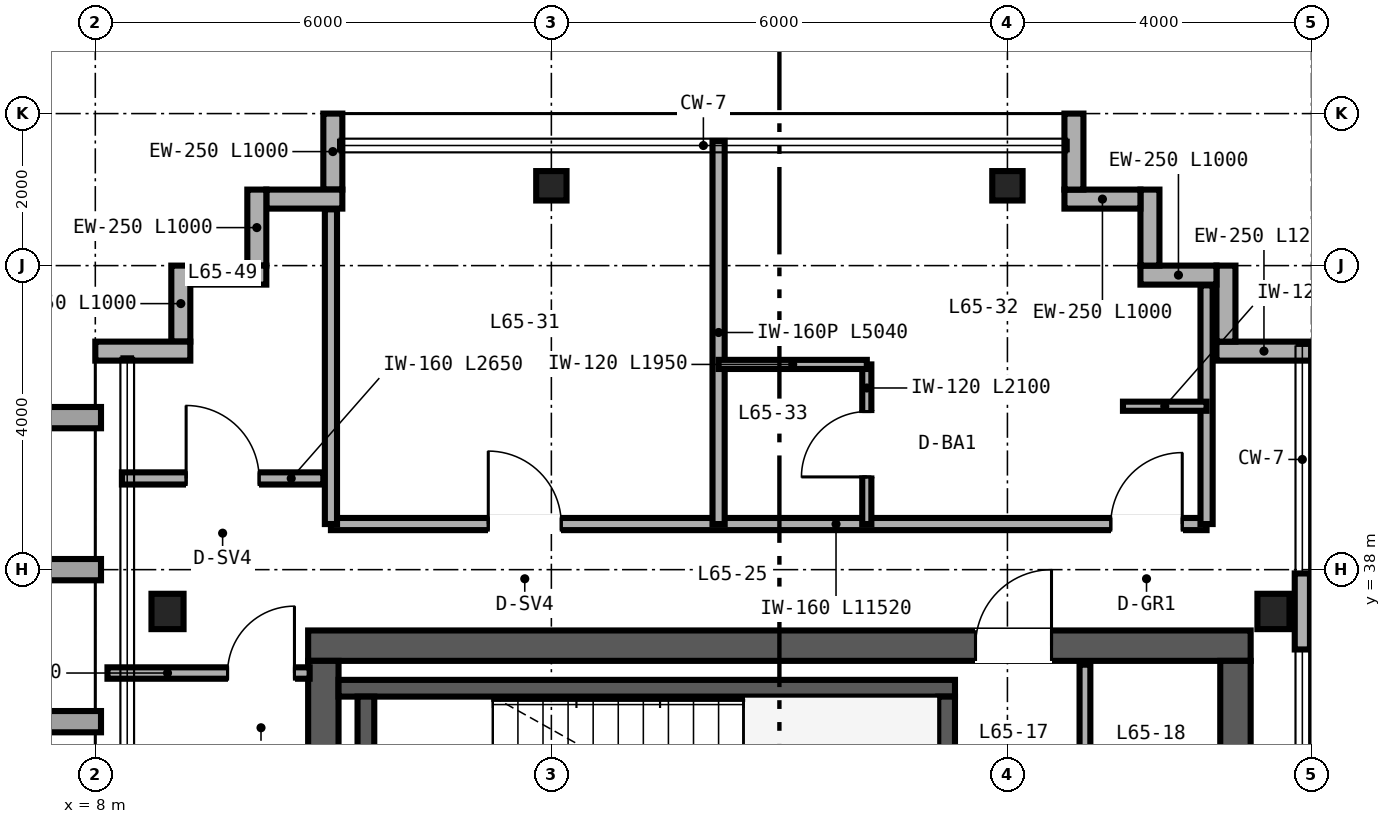
"""IFC4 building model, lengths in metres.
Left out: names, types, materials, properties, quantities, classifications, styles, units other than length and angle.
Written with IfcOpenShell. Run it as: python <this file> out.ifc"""

import sys

from ifc_helpers import new_model, si_unit, direction, frame, frame_2d, origin, origin_2d, place, context, subcontext, project, spatial, rectangle, i_section, extrude, source, transform, mapped, element, fill, save


model = new_model("IFC4")
c1 = context("Model", 3, precision=1e-05, world=origin(), true_north=direction((0.0, 1.0)))
c2 = subcontext(c1, "Body", "Model", "MODEL_VIEW")
j1 = project(units=[si_unit("LENGTHUNIT", "METRE"), si_unit("PLANEANGLEUNIT", "RADIAN")], contexts=[c1])
p1 = place(None, origin())
s1 = spatial("IfcSite", under=j1, at=p1, CompositionType="ELEMENT")
p2 = place(p1, origin())
s2 = spatial("IfcBuilding", under=s1, at=p2, CompositionType="ELEMENT")
p3 = place(p2, frame((0.0, 0.0, 258.0)))
s3 = spatial("IfcBuildingStorey", under=s2, at=p3, CompositionType="ELEMENT", Elevation=258.0)
p4 = place(p3, frame((10.8, 37.0, 0.0), z_axis=(0.0, 0.0, 1.0), x_axis=(1.0, 0.0, 0.0)))
e1 = element("IfcWall", 1, at=p4, inside=s3, PredefinedType="SHEAR", context=c2, shape_type="SweptSolid", body=[
    extrude(rectangle(XDim=12.4, YDim=0.4, at=frame_2d((6.2, 0.0))), origin(), (0.0, 0.0, 1.0), 3.38),
])
p5 = place(p4, frame((8.78, 0.0, 0.0)))
e2 = element("IfcOpeningElement", 2, at=p5, cuts=e1, PredefinedType="OPENING", context=c2, shape_type="SweptSolid", body=[
    extrude(rectangle(XDim=1.0, YDim=2.15, at=frame_2d((0.5, 1.075))), frame((0.0, 0.21, 0.0), z_axis=(0.0, -1.0, 0.0), x_axis=(1.0, 0.0, 0.0)), (0.0, 0.0, 1.0), 0.42),
])
for number, where, z_axis, x_axis in (
    (3, (11.0, 15.2, 0.0), (0.0, 0.0, 1.0), (0.0, 1.0, 0.0)),
    (4, (23.0, 15.2, 0.0), (0.0, 0.0, 1.0), (0.0, 1.0, 0.0)),
):
    element("IfcWall", number, at=place(p3, frame(where, z_axis=z_axis, x_axis=x_axis)), inside=s3, PredefinedType="SHEAR", context=c2, shape_type="SweptSolid", body=[
        extrude(rectangle(XDim=21.6, YDim=0.4, at=frame_2d((10.8, 0.0))), origin(), (0.0, 0.0, 1.0), 3.38),
    ])
p6 = place(p3, frame((11.2, 36.44, 0.0), z_axis=(0.0, 0.0, 1.0), x_axis=(1.0, 0.0, 0.0)))
e5 = element("IfcWall", 5, at=p6, inside=s3, PredefinedType="SHEAR", context=c2, shape_type="SweptSolid", body=[
    extrude(rectangle(XDim=8.11, YDim=0.22, at=frame_2d((4.055, 0.0))), origin(), (0.0, 0.0, 1.0), 3.4),
])
for number, where, z_axis, x_axis in (
    (6, (11.56, 33.05, 0.0), (0.0, 0.0, 1.0), (0.0, 1.0, 0.0)),
    (7, (19.2, 33.05, 0.0), (0.0, 0.0, 1.0), (0.0, 1.0, 0.0)),
):
    element("IfcWall", number, at=place(p3, frame(where, z_axis=z_axis, x_axis=x_axis)), inside=s3, PredefinedType="SHEAR", context=c2, shape_type="SweptSolid", body=[
        extrude(rectangle(XDim=3.28, YDim=0.22, at=frame_2d((1.64, 0.0))), origin(), (0.0, 0.0, 1.0), 3.4),
    ])
m1 = source(origin(), c2, "Body", "SweptSolid", [
    extrude(i_section(OverallWidth=0.422, OverallDepth=0.465, WebThickness=0.045, FlangeThickness=0.073, FilletRadius=0.025, at=origin_2d()), origin(), (0.0, 0.0, 1.0), 3.38),
])
for number, where, z_axis, x_axis in (
    (8, (8.95, 37.45, 0.0), (0.0, 0.0, 1.0), (1.0, 0.0, 0.0)),
    (9, (23.5, 37.45, 0.0), (0.0, 0.0, 1.0), (1.0, 0.0, 0.0)),
):
    element("IfcColumn", number, at=place(p3, frame(where, z_axis=z_axis, x_axis=x_axis)), inside=s3, PredefinedType="COLUMN", context=c2, shape_type="MappedRepresentation", body=[
        mapped(m1, transform((0.0, 0.0, 0.0), scale=1.0)),
    ])
m2 = source(origin(), c2, "Body", "SweptSolid", [
    extrude(i_section(OverallWidth=0.399, OverallDepth=0.387, WebThickness=0.021, FlangeThickness=0.033, FilletRadius=0.025, at=origin_2d()), origin(), (0.0, 0.0, 1.0), 3.38),
])
for number, where, z_axis, x_axis in (
    (10, (14.0, 43.05, 0.0), (0.0, 0.0, 1.0), (1.0, 0.0, 0.0)),
    (11, (20.0, 43.05, 0.0), (0.0, 0.0, 1.0), (1.0, 0.0, 0.0)),
):
    element("IfcColumn", number, at=place(p3, frame(where, z_axis=z_axis, x_axis=x_axis)), inside=s3, PredefinedType="COLUMN", context=c2, shape_type="MappedRepresentation", body=[
        mapped(m2, transform((0.0, 0.0, 0.0), scale=1.0)),
    ])
p7 = place(p3, frame((24.0, 40.875, 0.0), z_axis=(0.0, 0.0, 1.0), x_axis=(-1.0, 0.0, 0.0)))
e12 = element("IfcWall", 12, at=p7, inside=s3, PredefinedType="SOLIDWALL", context=c2, shape_type="SweptSolid", body=[
    extrude(rectangle(XDim=1.25, YDim=0.25, at=frame_2d((0.625, 0.0))), origin(), (0.0, 0.0, 1.0), 3.38),
])
for number, where, z_axis, x_axis in (
    (13, (22.875, 41.0, 0.0), (0.0, 0.0, 1.0), (0.0, 1.0, 0.0)),
    (14, (22.75, 41.875, 0.0), (0.0, 0.0, 1.0), (-1.0, 0.0, 0.0)),
    (15, (21.875, 42.0, 0.0), (0.0, 0.0, 1.0), (0.0, 1.0, 0.0)),
    (16, (21.75, 42.875, 0.0), (0.0, 0.0, 1.0), (-1.0, 0.0, 0.0)),
    (17, (20.875, 43.0, 0.0), (0.0, 0.0, 1.0), (0.0, 1.0, 0.0)),
    (18, (11.125, 44.0, 0.0), (0.0, 0.0, 1.0), (0.0, -1.0, 0.0)),
    (19, (11.25, 42.875, 0.0), (0.0, 0.0, 1.0), (-1.0, 0.0, 0.0)),
    (20, (10.125, 43.0, 0.0), (0.0, 0.0, 1.0), (0.0, -1.0, 0.0)),
    (21, (10.25, 41.875, 0.0), (0.0, 0.0, 1.0), (-1.0, 0.0, 0.0)),
    (22, (9.125, 42.0, 0.0), (0.0, 0.0, 1.0), (0.0, -1.0, 0.0)),
):
    element("IfcWall", number, at=place(p3, frame(where, z_axis=z_axis, x_axis=x_axis)), inside=s3, PredefinedType="SOLIDWALL", context=c2, shape_type="SweptSolid", body=[
        extrude(rectangle(XDim=1.0, YDim=0.25, at=frame_2d((0.5, 0.0))), origin(), (0.0, 0.0, 1.0), 3.38),
    ])
p8 = place(p3, frame((9.25, 40.875, 0.0), z_axis=(0.0, 0.0, 1.0), x_axis=(-1.0, 0.0, 0.0)))
e23 = element("IfcWall", 23, at=p8, inside=s3, PredefinedType="SOLIDWALL", context=c2, shape_type="SweptSolid", body=[
    extrude(rectangle(XDim=1.25, YDim=0.25, at=frame_2d((0.625, 0.0))), origin(), (0.0, 0.0, 1.0), 3.38),
])
p9 = place(p3, frame((23.88, 36.95, 0.0), z_axis=(0.0, 0.0, 1.0), x_axis=(0.0, 1.0, 0.0)))
e24 = element("IfcWall", 24, at=p9, inside=s3, PredefinedType="PARAPET", context=c2, shape_type="SweptSolid", body=[
    extrude(rectangle(XDim=1.0, YDim=0.2, at=frame_2d((0.5, 0.0))), origin(), (0.0, 0.0, 1.0), 3.38),
])
p10 = place(p3, frame((21.02, 33.28, 0.0), z_axis=(0.0, 0.0, 1.0), x_axis=(0.0, 1.0, 0.0)))
e25 = element("IfcWall", 25, at=p10, inside=s3, PredefinedType="PARTITIONING", context=c2, shape_type="SweptSolid", body=[
    extrude(rectangle(XDim=3.47, YDim=0.142, at=frame_2d((1.735, 0.0))), origin(), (0.0, 0.0, 1.0), 3.38),
])
p11 = place(p10, frame((1.15, 0.0, 0.0)))
e26 = element("IfcOpeningElement", 26, at=p11, cuts=e25, PredefinedType="OPENING", context=c2, shape_type="SweptSolid", body=[
    extrude(rectangle(XDim=0.84, YDim=2.1, at=frame_2d((0.42, 1.05))), frame((0.0, 0.081, 0.0), z_axis=(0.0, -1.0, 0.0), x_axis=(1.0, 0.0, 0.0)), (0.0, 0.0, 1.0), 0.162),
])
p12 = place(p3, frame((11.1, 38.6, 0.0), z_axis=(0.0, 0.0, 1.0), x_axis=(1.0, 0.0, 0.0)))
e27 = element("IfcWall", 27, at=p12, inside=s3, PredefinedType="PARTITIONING", context=c2, shape_type="SweptSolid", body=[
    extrude(rectangle(XDim=11.52, YDim=0.16, at=frame_2d((5.76, 0.0))), origin(), (0.0, 0.0, 1.0), 3.38),
])
p13 = place(p12, frame((2.07, 0.0, 0.0)))
e28 = element("IfcOpeningElement", 28, at=p13, cuts=e27, PredefinedType="OPENING", context=c2, shape_type="SweptSolid", body=[
    extrude(rectangle(XDim=0.96, YDim=2.15, at=frame_2d((0.48, 1.075))), frame((0.0, 0.09, 0.0), z_axis=(0.0, -1.0, 0.0), x_axis=(1.0, 0.0, 0.0)), (0.0, 0.0, 1.0), 0.18),
])
p14 = place(p12, frame((10.26, 0.0, 0.0)))
e29 = element("IfcOpeningElement", 29, at=p14, cuts=e27, PredefinedType="OPENING", context=c2, shape_type="SweptSolid", body=[
    extrude(rectangle(XDim=0.94, YDim=2.15, at=frame_2d((0.47, 1.075))), frame((0.0, 0.09, 0.0), z_axis=(0.0, -1.0, 0.0), x_axis=(1.0, 0.0, 0.0)), (0.0, 0.0, 1.0), 0.18),
])
p15 = place(p3, frame((11.1, 38.6, 0.0), z_axis=(0.0, 0.0, 1.0), x_axis=(0.0, 1.0, 0.0)))
e30 = element("IfcWall", 30, at=p15, inside=s3, PredefinedType="PARTITIONING", context=c2, shape_type="SweptSolid", body=[
    extrude(rectangle(XDim=4.14, YDim=0.16, at=frame_2d((2.07, 0.0))), origin(), (0.0, 0.0, 1.0), 3.38),
])
p16 = place(p3, frame((22.62, 38.6, 0.0), z_axis=(0.0, 0.0, 1.0), x_axis=(0.0, 1.0, 0.0)))
e31 = element("IfcWall", 31, at=p16, inside=s3, PredefinedType="PARTITIONING", context=c2, shape_type="SweptSolid", body=[
    extrude(rectangle(XDim=3.14, YDim=0.16, at=frame_2d((1.57, 0.0))), origin(), (0.0, 0.0, 1.0), 3.38),
])
p17 = place(p3, frame((16.2, 38.6, 0.0), z_axis=(0.0, 0.0, 1.0), x_axis=(0.0, 1.0, 0.0)))
e32 = element("IfcWall", 32, at=p17, inside=s3, PredefinedType="PARTITIONING", context=c2, shape_type="SweptSolid", body=[
    extrude(rectangle(XDim=5.04, YDim=0.16, at=frame_2d((2.52, 0.0))), origin(), (0.0, 0.0, 1.0), 2.687),
])
p18 = place(p3, frame((18.15, 38.6, 0.0), z_axis=(0.0, 0.0, 1.0), x_axis=(0.0, 1.0, 0.0)))
e33 = element("IfcWall", 33, at=p18, inside=s3, PredefinedType="PARTITIONING", context=c2, shape_type="SweptSolid", body=[
    extrude(rectangle(XDim=2.1, YDim=0.12, at=frame_2d((1.05, 0.0))), origin(), (0.0, 0.0, 1.0), 3.38),
])
p19 = place(p18, frame((0.62, 0.0, 0.0)))
e34 = element("IfcOpeningElement", 34, at=p19, cuts=e33, PredefinedType="OPENING", context=c2, shape_type="SweptSolid", body=[
    extrude(rectangle(XDim=0.86, YDim=2.1, at=frame_2d((0.43, 1.05))), frame((0.0, 0.07, 0.0), z_axis=(0.0, -1.0, 0.0), x_axis=(1.0, 0.0, 0.0)), (0.0, 0.0, 1.0), 0.14),
])
p20 = place(p3, frame((16.2, 40.7, 0.0), z_axis=(0.0, 0.0, 1.0), x_axis=(1.0, 0.0, 0.0)))
e35 = element("IfcWall", 35, at=p20, inside=s3, PredefinedType="PARTITIONING", context=c2, shape_type="SweptSolid", body=[
    extrude(rectangle(XDim=1.95, YDim=0.12, at=frame_2d((0.975, 0.0))), origin(), (0.0, 0.0, 1.0), 3.38),
])
p21 = place(p3, frame((21.52, 40.15, 0.0), z_axis=(0.0, 0.0, 1.0), x_axis=(1.0, 0.0, 0.0)))
e36 = element("IfcWall", 36, at=p21, inside=s3, PredefinedType="PARTITIONING", context=c2, shape_type="SweptSolid", body=[
    extrude(rectangle(XDim=1.1, YDim=0.12, at=frame_2d((0.55, 0.0))), origin(), (0.0, 0.0, 1.0), 3.38),
])
p22 = place(p3, frame((8.16, 36.64, 0.0), z_axis=(0.0, 0.0, 1.0), x_axis=(1.0, 0.0, 0.0)))
e37 = element("IfcWall", 37, at=p22, inside=s3, PredefinedType="PARTITIONING", context=c2, shape_type="SweptSolid", body=[
    extrude(rectangle(XDim=2.66, YDim=0.15, at=frame_2d((1.33, 0.0))), origin(), (0.0, 0.0, 1.0), 2.763),
])
p23 = place(p22, frame((1.58, 0.0, 0.0)))
e38 = element("IfcOpeningElement", 38, at=p23, cuts=e37, PredefinedType="OPENING", context=c2, shape_type="SweptSolid", body=[
    extrude(rectangle(XDim=0.88, YDim=2.15, at=frame_2d((0.44, 1.075))), frame((0.0, 0.085, 0.0), z_axis=(0.0, -1.0, 0.0), x_axis=(1.0, 0.0, 0.0)), (0.0, 0.0, 1.0), 0.17),
])
p24 = place(p3, frame((8.35, 39.2, 0.0), z_axis=(0.0, 0.0, 1.0), x_axis=(1.0, 0.0, 0.0)))
e39 = element("IfcWall", 39, at=p24, inside=s3, PredefinedType="PARTITIONING", context=c2, shape_type="SweptSolid", body=[
    extrude(rectangle(XDim=2.65, YDim=0.16, at=frame_2d((1.325, 0.0))), origin(), (0.0, 0.0, 1.0), 3.38),
])
p25 = place(p24, frame((0.845, 0.0, 0.0)))
e40 = element("IfcOpeningElement", 40, at=p25, cuts=e39, PredefinedType="OPENING", context=c2, shape_type="SweptSolid", body=[
    extrude(rectangle(XDim=0.96, YDim=2.15, at=frame_2d((0.48, 1.075))), frame((0.0, 0.09, 0.0), z_axis=(0.0, -1.0, 0.0), x_axis=(1.0, 0.0, 0.0)), (0.0, 0.0, 1.0), 0.18),
])
m3 = source(origin(), c2, "Body", "SweptSolid", [
    extrude(rectangle(XDim=1.0, YDim=2.15, at=frame_2d((0.5, 1.075))), frame((0.0, 0.025, 0.0), z_axis=(0.0, -1.0, 0.0), x_axis=(1.0, 0.0, 0.0)), (0.0, 0.0, 1.0), 0.05),
])
p26 = place(p5, origin())
e41 = element("IfcDoor", 41, at=p26, inside=s3, OperationType="SINGLE_SWING_RIGHT", PredefinedType="DOOR", context=c2, shape_type="MappedRepresentation", body=[
    mapped(m3, transform((0.0, 0.0, 0.0), scale=1.0)),
])
fill(e2, e41)
m4 = source(origin(), c2, "Body", "SweptSolid", [
    extrude(rectangle(XDim=0.86, YDim=2.1, at=frame_2d((0.43, 1.05))), frame((0.0, 0.025, 0.0), z_axis=(0.0, -1.0, 0.0), x_axis=(1.0, 0.0, 0.0)), (0.0, 0.0, 1.0), 0.05),
])
p27 = place(p19, origin())
e42 = element("IfcDoor", 42, at=p27, inside=s3, OperationType="SINGLE_SWING_LEFT", PredefinedType="DOOR", context=c2, shape_type="MappedRepresentation", body=[
    mapped(m4, transform((0.0, 0.0, 0.0), scale=1.0)),
])
fill(e34, e42)
m5 = source(origin(), c2, "Body", "SweptSolid", [
    extrude(rectangle(XDim=0.96, YDim=2.15, at=frame_2d((0.48, 1.075))), frame((0.0, 0.025, 0.0), z_axis=(0.0, -1.0, 0.0), x_axis=(1.0, 0.0, 0.0)), (0.0, 0.0, 1.0), 0.05),
])
p28 = place(p13, origin())
e43 = element("IfcDoor", 43, at=p28, inside=s3, OperationType="SINGLE_SWING_LEFT", PredefinedType="DOOR", context=c2, shape_type="MappedRepresentation", body=[
    mapped(m5, transform((0.0, 0.0, 0.0), scale=1.0)),
])
fill(e28, e43)
m6 = source(origin(), c2, "Body", "SweptSolid", [
    extrude(rectangle(XDim=0.94, YDim=2.15, at=frame_2d((0.47, 1.075))), frame((0.0, 0.025, 0.0), z_axis=(0.0, -1.0, 0.0), x_axis=(1.0, 0.0, 0.0)), (0.0, 0.0, 1.0), 0.05),
])
p29 = place(p14, origin())
e44 = element("IfcDoor", 44, at=p29, inside=s3, OperationType="SINGLE_SWING_RIGHT", PredefinedType="DOOR", context=c2, shape_type="MappedRepresentation", body=[
    mapped(m6, transform((0.0, 0.0, 0.0), scale=1.0)),
])
fill(e29, e44)
m7 = source(origin(), c2, "Body", "SweptSolid", [
    extrude(rectangle(XDim=0.88, YDim=2.15, at=frame_2d((0.44, 1.075))), frame((0.0, 0.025, 0.0), z_axis=(0.0, -1.0, 0.0), x_axis=(1.0, 0.0, 0.0)), (0.0, 0.0, 1.0), 0.05),
])
p30 = place(p23, origin())
e45 = element("IfcDoor", 45, at=p30, inside=s3, OperationType="SINGLE_SWING_RIGHT", PredefinedType="DOOR", context=c2, shape_type="MappedRepresentation", body=[
    mapped(m7, transform((0.0, 0.0, 0.0), scale=1.0)),
])
fill(e38, e45)
p31 = place(p25, origin())
e46 = element("IfcDoor", 46, at=p31, inside=s3, OperationType="SINGLE_SWING_LEFT", PredefinedType="DOOR", context=c2, shape_type="MappedRepresentation", body=[
    mapped(m5, transform((0.0, 0.0, 0.0), scale=1.0)),
])
fill(e40, e46)
save(model, sys.argv[1])
